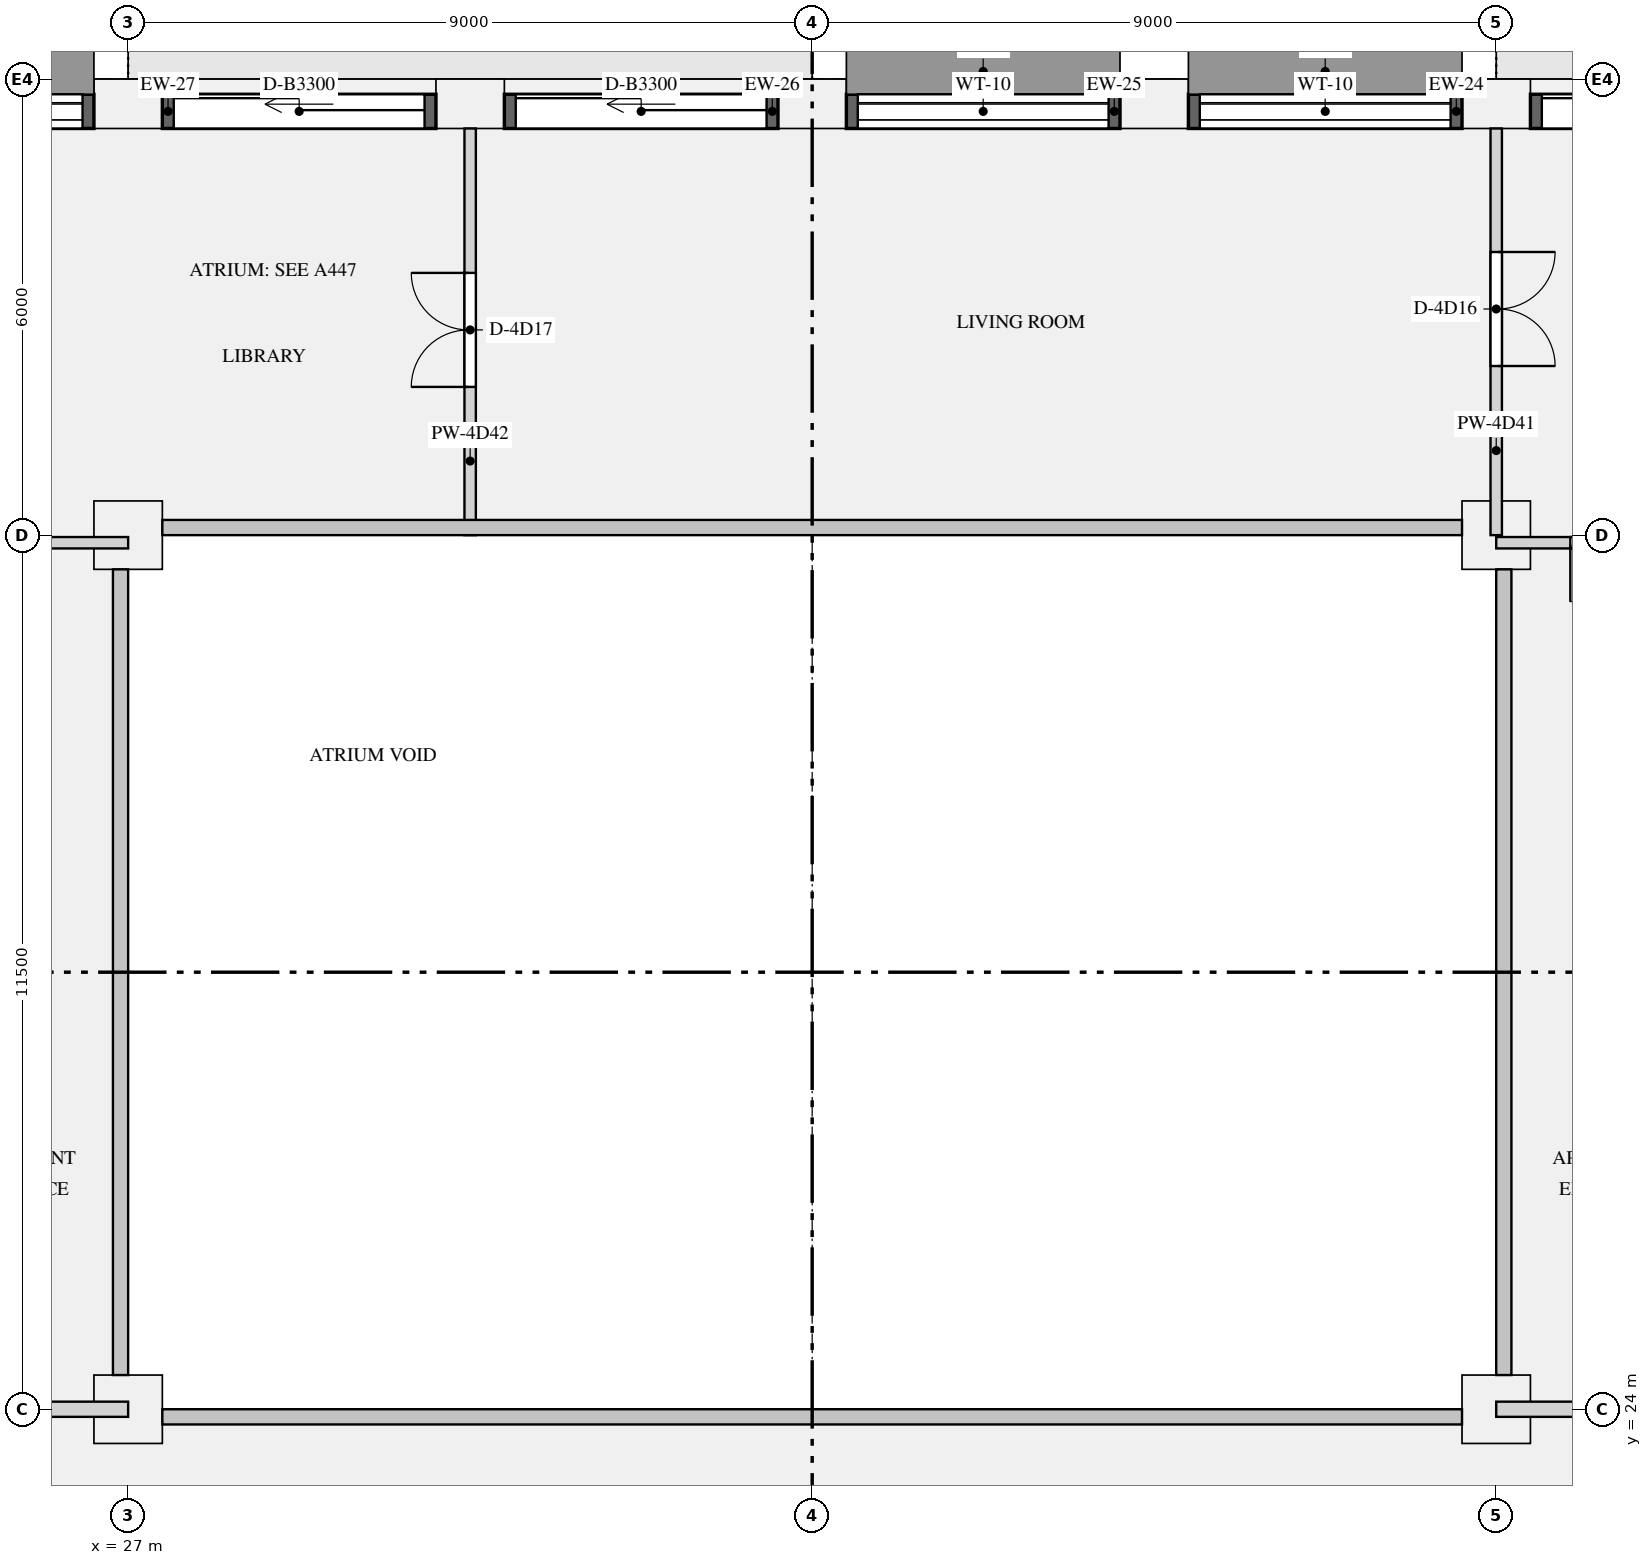
"""IFC4 building model, lengths in metres.
Left out: names, types, materials, properties, quantities, classifications, styles, units other than length and angle.
Written with IfcOpenShell. Run it as: python <this file> out.ifc"""

import sys

from ifc_helpers import new_model, si_unit, direction, frame, frame_2d, origin, origin_2d, place, context, subcontext, project, spatial, rectangle, extrude, element, fill, save


model = new_model("IFC4")
c1 = context("Model", 3, precision=1e-05, world=origin(), true_north=direction((0.0, 1.0)))
c2 = subcontext(c1, "Body", "Model", "MODEL_VIEW")
j1 = project(units=[si_unit("LENGTHUNIT", "METRE"), si_unit("PLANEANGLEUNIT", "RADIAN")], contexts=[c1])
p1 = place(None, origin())
s1 = spatial("IfcSite", under=j1, at=p1, CompositionType="ELEMENT")
p2 = place(p1, origin())
s2 = spatial("IfcBuilding", under=s1, at=p2, CompositionType="ELEMENT")
p3 = place(p2, frame((0.0, 0.0, 223.2)))
s3 = spatial("IfcBuildingStorey", under=s2, at=p3, CompositionType="ELEMENT", Elevation=223.2)
for number, where, z_axis, x_axis in (
    (1, (45.0, 41.175, 0.0), (0.0, 0.0, 1.0), (-1.0, 0.0, 0.0)),
    (2, (40.5, 41.175, 0.0), (0.0, 0.0, 1.0), (-1.0, 0.0, 0.0)),
    (3, (36.0, 41.175, 0.0), (0.0, 0.0, 1.0), (-1.0, 0.0, 0.0)),
    (4, (31.5, 41.175, 0.0), (0.0, 0.0, 1.0), (-1.0, 0.0, 0.0)),
    (5, (27.0, 41.175, 0.0), (0.0, 0.0, 1.0), (-1.0, 0.0, 0.0)),
):
    element("IfcColumn", number, at=place(p3, frame(where, z_axis=z_axis, x_axis=x_axis)), inside=s3, PredefinedType="USERDEFINED", context=c2, shape_type="SweptSolid", body=[
        extrude(rectangle(XDim=0.9, YDim=0.65, at=origin_2d()), origin(), (0.0, 0.0, 1.0), 3.15),
    ])
for number, where, z_axis, x_axis in (
    (6, (27.0, 24.0, 0.0), (0.0, 0.0, 1.0), (1.0, 0.0, 0.0)),
    (7, (45.0, 24.0, 0.0), (0.0, 0.0, 1.0), (1.0, 0.0, 0.0)),
    (8, (27.0, 35.5, 0.0), (0.0, 0.0, 1.0), (1.0, 0.0, 0.0)),
    (9, (45.0, 35.5, 0.0), (0.0, 0.0, 1.0), (1.0, 0.0, 0.0)),
):
    element("IfcColumn", number, at=place(p3, frame(where, z_axis=z_axis, x_axis=x_axis)), inside=s3, PredefinedType="COLUMN", context=c2, shape_type="SweptSolid", body=[
        extrude(rectangle(XDim=0.9, YDim=0.9, at=origin_2d()), origin(), (0.0, 0.0, 1.0), 3.15),
    ])
p4 = place(p3, frame((49.05, 41.075, 0.0), z_axis=(0.0, 0.0, 1.0), x_axis=(-1.0, 0.0, 0.0)))
e10 = element("IfcWall", 10, at=p4, inside=s3, PredefinedType="SOLIDWALL", context=c2, shape_type="SweptSolid", body=[
    extrude(rectangle(XDim=3.6, YDim=0.45, at=frame_2d((1.8, 0.0))), origin(), (0.0, 0.0, 1.0), 2.83),
])
p5 = place(p4, frame((0.15, 0.0, 0.0)))
e11 = element("IfcOpeningElement", 11, at=p5, cuts=e10, PredefinedType="OPENING", context=c2, shape_type="SweptSolid", body=[
    extrude(rectangle(XDim=3.3, YDim=2.3, at=frame_2d((1.65, 1.15))), frame((0.0, 0.235, 0.0), z_axis=(0.0, -1.0, 0.0), x_axis=(1.0, 0.0, 0.0)), (0.0, 0.0, 1.0), 0.47),
])
p6 = place(p3, frame((44.55, 41.075, 0.9), z_axis=(0.0, 0.0, 1.0), x_axis=(-1.0, 0.0, 0.0)))
e12 = element("IfcWall", 12, at=p6, inside=s3, PredefinedType="SOLIDWALL", context=c2, shape_type="SweptSolid", body=[
    extrude(rectangle(XDim=3.6, YDim=0.45, at=frame_2d((1.8, 0.0))), origin(), (0.0, 0.0, 1.0), 1.93),
])
p7 = place(p6, frame((0.15, 0.0, 0.15)))
e13 = element("IfcOpeningElement", 13, at=p7, cuts=e12, PredefinedType="OPENING", context=c2, shape_type="SweptSolid", body=[
    extrude(rectangle(XDim=3.3, YDim=1.5, at=frame_2d((1.65, 0.75))), frame((0.0, 0.235, 0.0), z_axis=(0.0, -1.0, 0.0), x_axis=(1.0, 0.0, 0.0)), (0.0, 0.0, 1.0), 0.47),
])
p8 = place(p3, frame((40.05, 41.075, 0.9), z_axis=(0.0, 0.0, 1.0), x_axis=(-1.0, 0.0, 0.0)))
e14 = element("IfcWall", 14, at=p8, inside=s3, PredefinedType="SOLIDWALL", context=c2, shape_type="SweptSolid", body=[
    extrude(rectangle(XDim=3.6, YDim=0.45, at=frame_2d((1.8, 0.0))), origin(), (0.0, 0.0, 1.0), 1.93),
])
p9 = place(p8, frame((0.15, 0.0, 0.15)))
e15 = element("IfcOpeningElement", 15, at=p9, cuts=e14, PredefinedType="OPENING", context=c2, shape_type="SweptSolid", body=[
    extrude(rectangle(XDim=3.3, YDim=1.5, at=frame_2d((1.65, 0.75))), frame((0.0, 0.235, 0.0), z_axis=(0.0, -1.0, 0.0), x_axis=(1.0, 0.0, 0.0)), (0.0, 0.0, 1.0), 0.47),
])
p10 = place(p3, frame((35.55, 41.075, 0.0), z_axis=(0.0, 0.0, 1.0), x_axis=(-1.0, 0.0, 0.0)))
e16 = element("IfcWall", 16, at=p10, inside=s3, PredefinedType="SOLIDWALL", context=c2, shape_type="SweptSolid", body=[
    extrude(rectangle(XDim=3.6, YDim=0.45, at=frame_2d((1.8, 0.0))), origin(), (0.0, 0.0, 1.0), 2.83),
])
p11 = place(p10, frame((0.15, 0.0, 0.0)))
e17 = element("IfcOpeningElement", 17, at=p11, cuts=e16, PredefinedType="OPENING", context=c2, shape_type="SweptSolid", body=[
    extrude(rectangle(XDim=3.3, YDim=2.3, at=frame_2d((1.65, 1.15))), frame((0.0, 0.235, 0.0), z_axis=(0.0, -1.0, 0.0), x_axis=(1.0, 0.0, 0.0)), (0.0, 0.0, 1.0), 0.47),
])
p12 = place(p3, frame((31.05, 41.075, 0.0), z_axis=(0.0, 0.0, 1.0), x_axis=(-1.0, 0.0, 0.0)))
e18 = element("IfcWall", 18, at=p12, inside=s3, PredefinedType="SOLIDWALL", context=c2, shape_type="SweptSolid", body=[
    extrude(rectangle(XDim=3.6, YDim=0.45, at=frame_2d((1.8, 0.0))), origin(), (0.0, 0.0, 1.0), 2.83),
])
p13 = place(p12, frame((0.15, 0.0, 0.0)))
e19 = element("IfcOpeningElement", 19, at=p13, cuts=e18, PredefinedType="OPENING", context=c2, shape_type="SweptSolid", body=[
    extrude(rectangle(XDim=3.3, YDim=2.3, at=frame_2d((1.65, 1.15))), frame((0.0, 0.235, 0.0), z_axis=(0.0, -1.0, 0.0), x_axis=(1.0, 0.0, 0.0)), (0.0, 0.0, 1.0), 0.47),
])
p14 = place(p3, frame((26.55, 41.075, 0.9), z_axis=(0.0, 0.0, 1.0), x_axis=(-1.0, 0.0, 0.0)))
e20 = element("IfcWall", 20, at=p14, inside=s3, PredefinedType="SOLIDWALL", context=c2, shape_type="SweptSolid", body=[
    extrude(rectangle(XDim=3.6, YDim=0.45, at=frame_2d((1.8, 0.0))), origin(), (0.0, 0.0, 1.0), 1.93),
])
p15 = place(p14, frame((0.15, 0.0, 0.15)))
e21 = element("IfcOpeningElement", 21, at=p15, cuts=e20, PredefinedType="OPENING", context=c2, shape_type="SweptSolid", body=[
    extrude(rectangle(XDim=3.3, YDim=1.5, at=frame_2d((1.65, 0.75))), frame((0.0, 0.235, 0.0), z_axis=(0.0, -1.0, 0.0), x_axis=(1.0, 0.0, 0.0)), (0.0, 0.0, 1.0), 0.47),
])
for number, where, z_axis, x_axis in (
    (22, (23.9, 24.0, 0.0), (0.0, 0.0, 1.0), (1.0, 0.0, 0.0)),
    (23, (45.0, 24.0, 0.0), (0.0, 0.0, 1.0), (1.0, 0.0, 0.0)),
):
    element("IfcWall", number, at=place(p3, frame(where, z_axis=z_axis, x_axis=x_axis)), inside=s3, PredefinedType="PARTITIONING", context=c2, shape_type="SweptSolid", body=[
        extrude(rectangle(XDim=3.1, YDim=0.2, at=frame_2d((1.55, 0.0))), origin(), (0.0, 0.0, 1.0), 2.83),
    ])
p16 = place(p3, frame((15.8, 35.4, 0.0), z_axis=(0.0, 0.0, 1.0), x_axis=(1.0, 0.0, 0.0)))
e24 = element("IfcWall", 24, at=p16, inside=s3, PredefinedType="PARTITIONING", context=c2, shape_type="SweptSolid", body=[
    extrude(rectangle(XDim=11.2, YDim=0.15, at=frame_2d((5.6, 0.0))), origin(), (0.0, 0.0, 1.0), 2.83),
])
p17 = place(p16, frame((9.025, 0.0, 0.0)))
e25 = element("IfcOpeningElement", 25, at=p17, cuts=e24, PredefinedType="OPENING", context=c2, shape_type="SweptSolid", body=[
    extrude(rectangle(XDim=0.9, YDim=2.1, at=frame_2d((0.45, 1.05))), frame((0.0, 0.085, 0.0), z_axis=(0.0, -1.0, 0.0), x_axis=(1.0, 0.0, 0.0)), (0.0, 0.0, 1.0), 0.17),
])
p18 = place(p16, frame((0.425, 0.0, 0.0)))
e26 = element("IfcOpeningElement", 26, at=p18, cuts=e24, PredefinedType="OPENING", context=c2, shape_type="SweptSolid", body=[
    extrude(rectangle(XDim=0.9, YDim=2.1, at=frame_2d((0.45, 1.05))), frame((0.0, 0.085, 0.0), z_axis=(0.0, -1.0, 0.0), x_axis=(1.0, 0.0, 0.0)), (0.0, 0.0, 1.0), 0.17),
])
p19 = place(p16, frame((4.225, 0.0, 0.0)))
e27 = element("IfcOpeningElement", 27, at=p19, cuts=e24, PredefinedType="OPENING", context=c2, shape_type="SweptSolid", body=[
    extrude(rectangle(XDim=0.9, YDim=2.1, at=frame_2d((0.45, 1.05))), frame((0.0, 0.085, 0.0), z_axis=(0.0, -1.0, 0.0), x_axis=(1.0, 0.0, 0.0)), (0.0, 0.0, 1.0), 0.17),
])
p20 = place(p3, frame((45.0, 35.4, 0.0), z_axis=(0.0, 0.0, 1.0), x_axis=(1.0, 0.0, 0.0)))
e28 = element("IfcWall", 28, at=p20, inside=s3, PredefinedType="PARTITIONING", context=c2, shape_type="SweptSolid", body=[
    extrude(rectangle(XDim=11.2, YDim=0.15, at=frame_2d((5.6, 0.0))), origin(), (0.0, 0.0, 1.0), 2.83),
])
p21 = place(p20, frame((5.325, 0.0, 0.0)))
e29 = element("IfcOpeningElement", 29, at=p21, cuts=e28, PredefinedType="OPENING", context=c2, shape_type="SweptSolid", body=[
    extrude(rectangle(XDim=0.9, YDim=2.1, at=frame_2d((0.45, 1.05))), frame((0.0, 0.085, 0.0), z_axis=(0.0, -1.0, 0.0), x_axis=(1.0, 0.0, 0.0)), (0.0, 0.0, 1.0), 0.17),
])
p22 = place(p20, frame((0.975, 0.0, 0.0)))
e30 = element("IfcOpeningElement", 30, at=p22, cuts=e28, PredefinedType="OPENING", context=c2, shape_type="SweptSolid", body=[
    extrude(rectangle(XDim=1.5, YDim=2.1, at=frame_2d((0.75, 1.05))), frame((0.0, 0.085, 0.0), z_axis=(0.0, -1.0, 0.0), x_axis=(1.0, 0.0, 0.0)), (0.0, 0.0, 1.0), 0.17),
])
p23 = place(p3, frame((45.0, 35.5, 0.0), z_axis=(0.0, 0.0, 1.0), x_axis=(0.0, 1.0, 0.0)))
e31 = element("IfcWall", 31, at=p23, inside=s3, PredefinedType="PARTITIONING", context=c2, shape_type="SweptSolid", body=[
    extrude(rectangle(XDim=5.35, YDim=0.15, at=frame_2d((2.675, 0.0))), origin(), (0.0, 0.0, 1.0), 2.83),
])
p24 = place(p23, frame((2.225, 0.0, 0.0)))
e32 = element("IfcOpeningElement", 32, at=p24, cuts=e31, PredefinedType="OPENING", context=c2, shape_type="SweptSolid", body=[
    extrude(rectangle(XDim=1.5, YDim=2.1, at=frame_2d((0.75, 1.05))), frame((0.0, 0.085, 0.0), z_axis=(0.0, -1.0, 0.0), x_axis=(1.0, 0.0, 0.0)), (0.0, 0.0, 1.0), 0.17),
])
p25 = place(p3, frame((31.5, 35.5, 0.0), z_axis=(0.0, 0.0, 1.0), x_axis=(0.0, 1.0, 0.0)))
e33 = element("IfcWall", 33, at=p25, inside=s3, PredefinedType="PARTITIONING", context=c2, shape_type="SweptSolid", body=[
    extrude(rectangle(XDim=5.35, YDim=0.15, at=frame_2d((2.675, 0.0))), origin(), (0.0, 0.0, 1.0), 2.83),
])
p26 = place(p25, frame((1.95, 0.0, 0.0)))
e34 = element("IfcOpeningElement", 34, at=p26, cuts=e33, PredefinedType="OPENING", context=c2, shape_type="SweptSolid", body=[
    extrude(rectangle(XDim=1.5, YDim=2.1, at=frame_2d((0.75, 1.05))), frame((0.0, 0.085, 0.0), z_axis=(0.0, -1.0, 0.0), x_axis=(1.0, 0.0, 0.0)), (0.0, 0.0, 1.0), 0.17),
])
p27 = place(p5, origin())
e35 = element("IfcDoor", 35, at=p27, inside=s3, OperationType="SLIDING_TO_LEFT", PredefinedType="DOOR", context=c2, shape_type="SweptSolid", body=[
    extrude(rectangle(XDim=3.3, YDim=2.3, at=frame_2d((1.65, 1.15))), frame((0.0, -0.07, 0.0), z_axis=(0.0, -1.0, 0.0), x_axis=(1.0, 0.0, 0.0)), (0.0, 0.0, 1.0), 0.05),
])
fill(e11, e35)
p28 = place(p7, origin())
e36 = element("IfcWindow", 36, at=p28, inside=s3, PartitioningType="SINGLE_PANEL", PredefinedType="WINDOW", context=c2, shape_type="SweptSolid", body=[
    extrude(rectangle(XDim=3.3, YDim=1.5, at=frame_2d((1.65, 0.75))), frame((0.0, -0.065, 0.0), z_axis=(0.0, -1.0, 0.0), x_axis=(1.0, 0.0, 0.0)), (0.0, 0.0, 1.0), 0.06),
])
fill(e13, e36)
p29 = place(p9, origin())
e37 = element("IfcWindow", 37, at=p29, inside=s3, PartitioningType="SINGLE_PANEL", PredefinedType="WINDOW", context=c2, shape_type="SweptSolid", body=[
    extrude(rectangle(XDim=3.3, YDim=1.5, at=frame_2d((1.65, 0.75))), frame((0.0, -0.065, 0.0), z_axis=(0.0, -1.0, 0.0), x_axis=(1.0, 0.0, 0.0)), (0.0, 0.0, 1.0), 0.06),
])
fill(e15, e37)
p30 = place(p11, origin())
e38 = element("IfcDoor", 38, at=p30, inside=s3, OperationType="SLIDING_TO_LEFT", PredefinedType="DOOR", context=c2, shape_type="SweptSolid", body=[
    extrude(rectangle(XDim=3.3, YDim=2.3, at=frame_2d((1.65, 1.15))), frame((0.0, -0.07, 0.0), z_axis=(0.0, -1.0, 0.0), x_axis=(1.0, 0.0, 0.0)), (0.0, 0.0, 1.0), 0.05),
])
fill(e17, e38)
p31 = place(p13, origin())
e39 = element("IfcDoor", 39, at=p31, inside=s3, OperationType="SLIDING_TO_LEFT", PredefinedType="DOOR", context=c2, shape_type="SweptSolid", body=[
    extrude(rectangle(XDim=3.3, YDim=2.3, at=frame_2d((1.65, 1.15))), frame((0.0, -0.07, 0.0), z_axis=(0.0, -1.0, 0.0), x_axis=(1.0, 0.0, 0.0)), (0.0, 0.0, 1.0), 0.05),
])
fill(e19, e39)
p32 = place(p15, origin())
e40 = element("IfcWindow", 40, at=p32, inside=s3, PartitioningType="SINGLE_PANEL", PredefinedType="WINDOW", context=c2, shape_type="SweptSolid", body=[
    extrude(rectangle(XDim=3.3, YDim=1.5, at=frame_2d((1.65, 0.75))), frame((0.0, -0.065, 0.0), z_axis=(0.0, -1.0, 0.0), x_axis=(1.0, 0.0, 0.0)), (0.0, 0.0, 1.0), 0.06),
])
fill(e21, e40)
p33 = place(p22, frame((1.5, 0.0, 0.0), z_axis=(0.0, 0.0, 1.0), x_axis=(-1.0, 0.0, 0.0)))
e41 = element("IfcDoor", 41, at=p33, inside=s3, OperationType="DOUBLE_DOOR_SINGLE_SWING", PredefinedType="DOOR", context=c2, shape_type="SweptSolid", body=[
    extrude(rectangle(XDim=1.5, YDim=2.1, at=frame_2d((0.75, 1.05))), frame((0.0, 0.025, 0.0), z_axis=(0.0, -1.0, 0.0), x_axis=(1.0, 0.0, 0.0)), (0.0, 0.0, 1.0), 0.05),
])
fill(e30, e41)
p34 = place(p24, frame((1.5, 0.0, 0.0), z_axis=(0.0, 0.0, 1.0), x_axis=(-1.0, 0.0, 0.0)))
e42 = element("IfcDoor", 42, at=p34, inside=s3, OperationType="DOUBLE_DOOR_SINGLE_SWING", PredefinedType="DOOR", context=c2, shape_type="SweptSolid", body=[
    extrude(rectangle(XDim=1.5, YDim=2.1, at=frame_2d((0.75, 1.05))), frame((0.0, 0.025, 0.0), z_axis=(0.0, -1.0, 0.0), x_axis=(1.0, 0.0, 0.0)), (0.0, 0.0, 1.0), 0.05),
])
fill(e32, e42)
p35 = place(p26, origin())
e43 = element("IfcDoor", 43, at=p35, inside=s3, OperationType="DOUBLE_DOOR_SINGLE_SWING", PredefinedType="DOOR", context=c2, shape_type="SweptSolid", body=[
    extrude(rectangle(XDim=1.5, YDim=2.1, at=frame_2d((0.75, 1.05))), frame((0.0, 0.025, 0.0), z_axis=(0.0, -1.0, 0.0), x_axis=(1.0, 0.0, 0.0)), (0.0, 0.0, 1.0), 0.05),
])
fill(e34, e43)
save(model, sys.argv[1])
